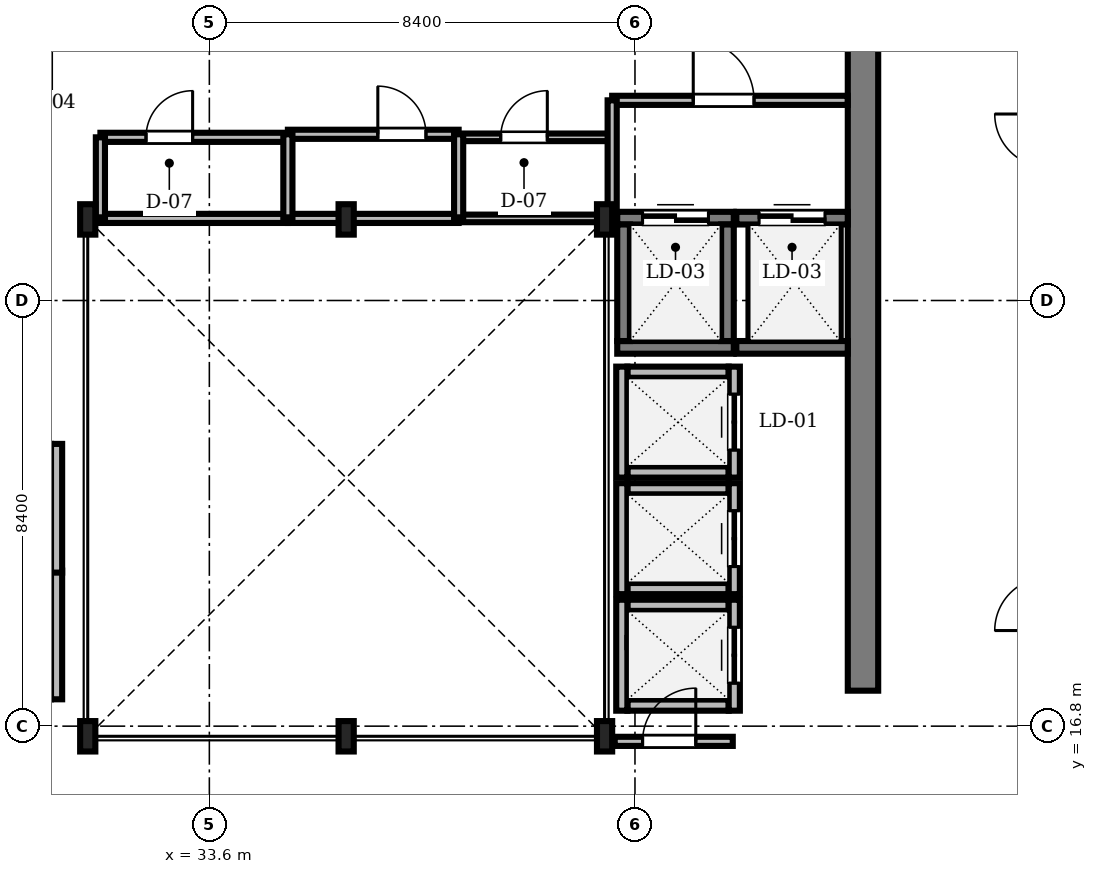
"""IFC4 building model, lengths in metres.
Left out: names, types, materials, properties, quantities, classifications, styles, units other than length and angle.
Written with IfcOpenShell. Run it as: python <this file> out.ifc"""

import sys

from ifc_helpers import new_model, si_unit, direction, frame, frame_2d, origin, origin_2d, place, context, subcontext, project, spatial, rectangle, i_section, extrude, source, transform, mapped, element, fill, save


model = new_model("IFC4")
c1 = context("Model", 3, precision=1e-05, world=origin(), true_north=direction((0.0, 1.0)))
c2 = subcontext(c1, "Body", "Model", "MODEL_VIEW")
j1 = project(units=[si_unit("LENGTHUNIT", "METRE"), si_unit("PLANEANGLEUNIT", "RADIAN")], contexts=[c1])
p1 = place(None, origin())
s1 = spatial("IfcSite", under=j1, at=p1, CompositionType="ELEMENT")
p2 = place(p1, origin())
s2 = spatial("IfcBuilding", under=s1, at=p2, CompositionType="ELEMENT")
p3 = place(p2, frame((0.0, 0.0, 242.7)))
s3 = spatial("IfcBuildingStorey", under=s2, at=p3, CompositionType="ELEMENT", Elevation=242.7)
m1 = source(origin(), c2, "Body", "SweptSolid", [
    extrude(rectangle(XDim=13.15, YDim=0.6, at=frame_2d((6.575, 0.0))), origin(), (0.0, 0.0, 1.0), 3.73),
])
p4 = place(p3, frame((46.5, 17.5, 0.0), z_axis=(0.0, 0.0, 1.0), x_axis=(0.0, 1.0, 0.0)))
e1 = element("IfcWall", 1, at=p4, inside=s3, PredefinedType="SHEAR", context=c2, shape_type="MappedRepresentation", body=[
    mapped(m1, transform((0.0, 0.0, 0.0), scale=1.0)),
])
m2 = source(origin(), c2, "Body", "SweptSolid", [
    extrude(i_section(OverallWidth=0.3, OverallDepth=0.6, WebThickness=0.015, FlangeThickness=0.03, FilletRadius=0.027, at=origin_2d()), origin(), (0.0, 0.0, 1.0), 3.73),
])
for number, where, z_axis, x_axis in (
    (2, (31.2, 16.6, 0.0), (0.0, 0.0, 1.0), (1.0, 0.0, 0.0)),
    (3, (36.3, 16.6, 0.0), (0.0, 0.0, 1.0), (1.0, 0.0, 0.0)),
    (4, (41.4, 16.6, 0.0), (0.0, 0.0, 1.0), (1.0, 0.0, 0.0)),
    (5, (41.4, 26.8, 0.0), (0.0, 0.0, 1.0), (1.0, 0.0, 0.0)),
    (6, (36.3, 26.8, 0.0), (0.0, 0.0, 1.0), (1.0, 0.0, 0.0)),
    (7, (31.2, 26.8, 0.0), (0.0, 0.0, 1.0), (1.0, 0.0, 0.0)),
):
    element("IfcColumn", number, at=place(p3, frame(where, z_axis=z_axis, x_axis=x_axis)), inside=s3, PredefinedType="COLUMN", context=c2, shape_type="MappedRepresentation", body=[
        mapped(m2, transform((0.0, 0.0, 0.0), scale=1.0)),
    ])
m3 = source(origin(), c2, "Body", "SweptSolid", [
    extrude(rectangle(XDim=2.0, YDim=0.22, at=frame_2d((1.0, 0.0))), origin(), (0.0, 0.0, 1.0), 3.73),
])
for number, where, z_axis, x_axis in (
    (8, (41.85, 21.815, 0.0), (0.0, 0.0, 1.0), (1.0, 0.0, 0.0)),
    (9, (41.85, 23.785, 0.0), (0.0, 0.0, 1.0), (1.0, 0.0, 0.0)),
):
    element("IfcWall", number, at=place(p3, frame(where, z_axis=z_axis, x_axis=x_axis)), inside=s3, PredefinedType="SOLIDWALL", context=c2, shape_type="MappedRepresentation", body=[
        mapped(m3, transform((0.0, 0.0, 0.0), scale=1.0)),
    ])
m4 = source(origin(), c2, "Body", "SweptSolid", [
    extrude(rectangle(XDim=2.19, YDim=0.22, at=frame_2d((1.095, 0.0))), origin(), (0.0, 0.0, 1.0), 3.73),
])
p5 = place(p3, frame((41.74, 21.705, 0.0), z_axis=(0.0, 0.0, 1.0), x_axis=(0.0, 1.0, 0.0)))
e10 = element("IfcWall", 10, at=p5, inside=s3, PredefinedType="SOLIDWALL", context=c2, shape_type="MappedRepresentation", body=[
    mapped(m4, transform((0.0, 0.0, 0.0), scale=1.0)),
])
p6 = place(p3, frame((43.96, 21.705, 0.0), z_axis=(0.0, 0.0, 1.0), x_axis=(0.0, 1.0, 0.0)))
e11 = element("IfcWall", 11, at=p6, inside=s3, PredefinedType="SOLIDWALL", context=c2, shape_type="MappedRepresentation", body=[
    mapped(m4, transform((0.0, 0.0, 0.0), scale=1.0)),
])
m5 = source(origin(), c2, "Body", "SweptSolid", [
    extrude(rectangle(XDim=1.1, YDim=2.2, at=frame_2d((0.55, 1.1))), frame((0.0, 0.12, 0.0), z_axis=(0.0, -1.0, 0.0), x_axis=(1.0, 0.0, 0.0)), (0.0, 0.0, 1.0), 0.24),
])
p7 = place(p6, frame((0.545, 0.0, 0.0)))
e12 = element("IfcOpeningElement", 12, at=p7, cuts=e11, PredefinedType="OPENING", context=c2, shape_type="MappedRepresentation", body=[
    mapped(m5, transform((0.0, 0.0, 0.0), scale=1.0)),
])
for number, where, z_axis, x_axis in (
    (13, (41.85, 19.515, 0.0), (0.0, 0.0, 1.0), (1.0, 0.0, 0.0)),
    (14, (41.85, 21.485, 0.0), (0.0, 0.0, 1.0), (1.0, 0.0, 0.0)),
):
    element("IfcWall", number, at=place(p3, frame(where, z_axis=z_axis, x_axis=x_axis)), inside=s3, PredefinedType="SOLIDWALL", context=c2, shape_type="MappedRepresentation", body=[
        mapped(m3, transform((0.0, 0.0, 0.0), scale=1.0)),
    ])
p8 = place(p3, frame((41.74, 19.405, 0.0), z_axis=(0.0, 0.0, 1.0), x_axis=(0.0, 1.0, 0.0)))
e15 = element("IfcWall", 15, at=p8, inside=s3, PredefinedType="SOLIDWALL", context=c2, shape_type="MappedRepresentation", body=[
    mapped(m4, transform((0.0, 0.0, 0.0), scale=1.0)),
])
p9 = place(p3, frame((43.96, 19.405, 0.0), z_axis=(0.0, 0.0, 1.0), x_axis=(0.0, 1.0, 0.0)))
e16 = element("IfcWall", 16, at=p9, inside=s3, PredefinedType="SOLIDWALL", context=c2, shape_type="MappedRepresentation", body=[
    mapped(m4, transform((0.0, 0.0, 0.0), scale=1.0)),
])
p10 = place(p9, frame((0.545, 0.0, 0.0)))
e17 = element("IfcOpeningElement", 17, at=p10, cuts=e16, PredefinedType="OPENING", context=c2, shape_type="MappedRepresentation", body=[
    mapped(m5, transform((0.0, 0.0, 0.0), scale=1.0)),
])
for number, where, z_axis, x_axis in (
    (18, (41.85, 17.215, 0.0), (0.0, 0.0, 1.0), (1.0, 0.0, 0.0)),
    (19, (41.85, 19.185, 0.0), (0.0, 0.0, 1.0), (1.0, 0.0, 0.0)),
):
    element("IfcWall", number, at=place(p3, frame(where, z_axis=z_axis, x_axis=x_axis)), inside=s3, PredefinedType="SOLIDWALL", context=c2, shape_type="MappedRepresentation", body=[
        mapped(m3, transform((0.0, 0.0, 0.0), scale=1.0)),
    ])
p11 = place(p3, frame((41.74, 17.105, 0.0), z_axis=(0.0, 0.0, 1.0), x_axis=(0.0, 1.0, 0.0)))
e20 = element("IfcWall", 20, at=p11, inside=s3, PredefinedType="SOLIDWALL", context=c2, shape_type="MappedRepresentation", body=[
    mapped(m4, transform((0.0, 0.0, 0.0), scale=1.0)),
])
p12 = place(p3, frame((43.96, 17.105, 0.0), z_axis=(0.0, 0.0, 1.0), x_axis=(0.0, 1.0, 0.0)))
e21 = element("IfcWall", 21, at=p12, inside=s3, PredefinedType="SOLIDWALL", context=c2, shape_type="MappedRepresentation", body=[
    mapped(m4, transform((0.0, 0.0, 0.0), scale=1.0)),
])
p13 = place(p12, frame((0.545, 0.0, 0.0)))
e22 = element("IfcOpeningElement", 22, at=p13, cuts=e21, PredefinedType="OPENING", context=c2, shape_type="MappedRepresentation", body=[
    mapped(m5, transform((0.0, 0.0, 0.0), scale=1.0)),
])
m6 = source(origin(), c2, "Body", "SweptSolid", [
    extrude(rectangle(XDim=2.54, YDim=0.22, at=frame_2d((1.27, 0.0))), origin(), (0.0, 0.0, 1.0), 3.73),
])
for number, where, z_axis, x_axis in (
    (23, (30.585, 17.33, 0.0), (0.0, 0.0, 1.0), (0.0, 1.0, 0.0)),
    (24, (30.585, 19.83, 0.0), (0.0, 0.0, 1.0), (0.0, 1.0, 0.0)),
):
    element("IfcWall", number, at=place(p3, frame(where, z_axis=z_axis, x_axis=x_axis)), inside=s3, PredefinedType="SOLIDWALL", context=c2, shape_type="MappedRepresentation", body=[
        mapped(m6, transform((0.0, 0.0, 0.0), scale=1.0)),
    ])
m7 = source(origin(), c2, "Body", "SweptSolid", [
    extrude(rectangle(XDim=2.3, YDim=0.25, at=frame_2d((1.15, 0.0))), origin(), (0.0, 0.0, 1.0), 3.73),
])
p14 = place(p3, frame((41.65, 24.275, 0.0), z_axis=(0.0, 0.0, 1.0), x_axis=(1.0, 0.0, 0.0)))
e25 = element("IfcWall", 25, at=p14, inside=s3, PredefinedType="SOLIDWALL", context=c2, shape_type="MappedRepresentation", body=[
    mapped(m7, transform((0.0, 0.0, 0.0), scale=1.0)),
])
p15 = place(p3, frame((41.65, 26.825, 0.0), z_axis=(0.0, 0.0, 1.0), x_axis=(1.0, 0.0, 0.0)))
e26 = element("IfcWall", 26, at=p15, inside=s3, PredefinedType="SOLIDWALL", context=c2, shape_type="MappedRepresentation", body=[
    mapped(m7, transform((0.0, 0.0, 0.0), scale=1.0)),
])
m8 = source(origin(), c2, "Body", "SweptSolid", [
    extrude(rectangle(XDim=1.3, YDim=2.3, at=frame_2d((0.65, 1.15))), frame((0.0, 0.135, 0.0), z_axis=(0.0, -1.0, 0.0), x_axis=(1.0, 0.0, 0.0)), (0.0, 0.0, 1.0), 0.27),
])
p16 = place(p15, frame((0.5, 0.0, 0.0)))
e27 = element("IfcOpeningElement", 27, at=p16, cuts=e26, PredefinedType="OPENING", context=c2, shape_type="MappedRepresentation", body=[
    mapped(m8, transform((0.0, 0.0, 0.0), scale=1.0)),
])
for number, where, z_axis, x_axis in (
    (28, (41.775, 24.4, 0.0), (0.0, 0.0, 1.0), (0.0, 1.0, 0.0)),
    (29, (43.825, 24.4, 0.0), (0.0, 0.0, 1.0), (0.0, 1.0, 0.0)),
):
    element("IfcWall", number, at=place(p3, frame(where, z_axis=z_axis, x_axis=x_axis)), inside=s3, PredefinedType="SOLIDWALL", context=c2, shape_type="MappedRepresentation", body=[
        mapped(m7, transform((0.0, 0.0, 0.0), scale=1.0)),
    ])
m9 = source(origin(), c2, "Body", "SweptSolid", [
    extrude(rectangle(XDim=2.2, YDim=0.25, at=frame_2d((1.1, 0.0))), origin(), (0.0, 0.0, 1.0), 3.73),
])
p17 = place(p3, frame((44.0, 24.275, 0.0), z_axis=(0.0, 0.0, 1.0), x_axis=(1.0, 0.0, 0.0)))
e30 = element("IfcWall", 30, at=p17, inside=s3, PredefinedType="SOLIDWALL", context=c2, shape_type="MappedRepresentation", body=[
    mapped(m9, transform((0.0, 0.0, 0.0), scale=1.0)),
])
p18 = place(p3, frame((44.0, 26.825, 0.0), z_axis=(0.0, 0.0, 1.0), x_axis=(1.0, 0.0, 0.0)))
e31 = element("IfcWall", 31, at=p18, inside=s3, PredefinedType="SOLIDWALL", context=c2, shape_type="MappedRepresentation", body=[
    mapped(m9, transform((0.0, 0.0, 0.0), scale=1.0)),
])
p19 = place(p18, frame((0.45, 0.0, 0.0)))
e32 = element("IfcOpeningElement", 32, at=p19, cuts=e31, PredefinedType="OPENING", context=c2, shape_type="MappedRepresentation", body=[
    mapped(m8, transform((0.0, 0.0, 0.0), scale=1.0)),
])
m10 = source(origin(), c2, "Body", "SweptSolid", [
    extrude(rectangle(XDim=4.648, YDim=0.18, at=frame_2d((2.324, 0.0))), origin(), (0.0, 0.0, 1.0), 3.362),
])
p20 = place(p3, frame((41.55, 29.15, 0.0), z_axis=(0.0, 0.0, 1.0), x_axis=(1.0, 0.0, 0.0)))
e33 = element("IfcWall", 33, at=p20, inside=s3, PredefinedType="PARTITIONING", context=c2, shape_type="MappedRepresentation", body=[
    mapped(m10, transform((0.0, 0.0, 0.0), scale=1.0)),
])
m11 = source(origin(), c2, "Body", "SweptSolid", [
    extrude(rectangle(XDim=1.2, YDim=2.2, at=frame_2d((0.6, 1.1))), frame((0.0, 0.1, 0.0), z_axis=(0.0, -1.0, 0.0), x_axis=(1.0, 0.0, 0.0)), (0.0, 0.0, 1.0), 0.2),
])
p21 = place(p20, frame((1.6, 0.0, 0.0)))
e34 = element("IfcOpeningElement", 34, at=p21, cuts=e33, PredefinedType="OPENING", context=c2, shape_type="MappedRepresentation", body=[
    mapped(m11, transform((0.0, 0.0, 0.0), scale=1.0)),
])
m12 = source(origin(), c2, "Body", "SweptSolid", [
    extrude(rectangle(XDim=3.7, YDim=0.18, at=frame_2d((1.85, 0.0))), origin(), (0.0, 0.0, 1.0), 3.362),
])
p22 = place(p3, frame((31.45, 28.42, 0.0), z_axis=(0.0, 0.0, 1.0), x_axis=(1.0, 0.0, 0.0)))
e35 = element("IfcWall", 35, at=p22, inside=s3, PredefinedType="PARTITIONING", context=c2, shape_type="MappedRepresentation", body=[
    mapped(m12, transform((0.0, 0.0, 0.0), scale=1.0)),
])
m13 = source(origin(), c2, "Body", "SweptSolid", [
    extrude(rectangle(XDim=0.92, YDim=2.1, at=frame_2d((0.46, 1.05))), frame((0.0, 0.1, 0.0), z_axis=(0.0, -1.0, 0.0), x_axis=(1.0, 0.0, 0.0)), (0.0, 0.0, 1.0), 0.2),
])
p23 = place(p22, frame((0.9, 0.0, 0.0)))
e36 = element("IfcOpeningElement", 36, at=p23, cuts=e35, PredefinedType="OPENING", context=c2, shape_type="MappedRepresentation", body=[
    mapped(m13, transform((0.0, 0.0, 0.0), scale=1.0)),
])
m14 = source(origin(), c2, "Body", "SweptSolid", [
    extrude(rectangle(XDim=3.37, YDim=0.18, at=frame_2d((1.685, 0.0))), origin(), (0.0, 0.0, 1.0), 3.73),
])
p24 = place(p3, frame((35.15, 28.48, 0.0), z_axis=(0.0, 0.0, 1.0), x_axis=(1.0, 0.0, 0.0)))
e37 = element("IfcWall", 37, at=p24, inside=s3, PredefinedType="PARTITIONING", context=c2, shape_type="MappedRepresentation", body=[
    mapped(m14, transform((0.0, 0.0, 0.0), scale=1.0)),
])
m15 = source(origin(), c2, "Body", "SweptSolid", [
    extrude(rectangle(XDim=0.95, YDim=2.15, at=frame_2d((0.475, 1.075))), frame((0.0, 0.1, 0.0), z_axis=(0.0, -1.0, 0.0), x_axis=(1.0, 0.0, 0.0)), (0.0, 0.0, 1.0), 0.2),
])
p25 = place(p24, frame((1.775, 0.0, 0.0)))
e38 = element("IfcOpeningElement", 38, at=p25, cuts=e37, PredefinedType="OPENING", context=c2, shape_type="MappedRepresentation", body=[
    mapped(m15, transform((0.0, 0.0, 0.0), scale=1.0)),
])
m16 = source(origin(), c2, "Body", "SweptSolid", [
    extrude(rectangle(XDim=3.0, YDim=0.15, at=frame_2d((1.5, 0.0))), origin(), (0.0, 0.0, 1.0), 3.73),
])
p26 = place(p3, frame((38.52, 28.42, 0.0), z_axis=(0.0, 0.0, 1.0), x_axis=(1.0, 0.0, 0.0)))
e39 = element("IfcWall", 39, at=p26, inside=s3, PredefinedType="PARTITIONING", context=c2, shape_type="MappedRepresentation", body=[
    mapped(m16, transform((0.0, 0.0, 0.0), scale=1.0)),
])
m17 = source(origin(), c2, "Body", "SweptSolid", [
    extrude(rectangle(XDim=0.92, YDim=2.1, at=frame_2d((0.46, 1.05))), frame((0.0, 0.085, 0.0), z_axis=(0.0, -1.0, 0.0), x_axis=(1.0, 0.0, 0.0)), (0.0, 0.0, 1.0), 0.17),
])
p27 = place(p26, frame((0.83, 0.0, 0.0)))
e40 = element("IfcOpeningElement", 40, at=p27, cuts=e39, PredefinedType="OPENING", context=c2, shape_type="MappedRepresentation", body=[
    mapped(m17, transform((0.0, 0.0, 0.0), scale=1.0)),
])
m18 = source(origin(), c2, "Body", "SweptSolid", [
    extrude(rectangle(XDim=2.33, YDim=0.18, at=frame_2d((1.165, 0.0))), origin(), (0.0, 0.0, 1.0), 3.172),
])
p28 = place(p3, frame((41.6, 16.5, 0.0), z_axis=(0.0, 0.0, 1.0), x_axis=(1.0, 0.0, 0.0)))
e41 = element("IfcWall", 41, at=p28, inside=s3, PredefinedType="PARTITIONING", context=c2, shape_type="MappedRepresentation", body=[
    mapped(m18, transform((0.0, 0.0, 0.0), scale=1.0)),
])
m19 = source(origin(), c2, "Body", "SweptSolid", [
    extrude(rectangle(XDim=1.05, YDim=2.2, at=frame_2d((0.525, 1.1))), frame((0.0, 0.1, 0.0), z_axis=(0.0, -1.0, 0.0), x_axis=(1.0, 0.0, 0.0)), (0.0, 0.0, 1.0), 0.2),
])
p29 = place(p28, frame((0.55, 0.0, 0.0)))
e42 = element("IfcOpeningElement", 42, at=p29, cuts=e41, PredefinedType="OPENING", context=c2, shape_type="MappedRepresentation", body=[
    mapped(m19, transform((0.0, 0.0, 0.0), scale=1.0)),
])
m20 = source(origin(), c2, "Body", "SweptSolid", [
    extrude(rectangle(XDim=3.7, YDim=0.18, at=frame_2d((1.85, 0.0))), origin(), (0.0, 0.0, 1.0), 3.272),
])
p30 = place(p3, frame((31.45, 26.82, 0.0), z_axis=(0.0, 0.0, 1.0), x_axis=(1.0, 0.0, 0.0)))
e43 = element("IfcWall", 43, at=p30, inside=s3, PredefinedType="PARTITIONING", context=c2, shape_type="MappedRepresentation", body=[
    mapped(m20, transform((0.0, 0.0, 0.0), scale=1.0)),
])
m21 = source(origin(), c2, "Body", "SweptSolid", [
    extrude(rectangle(XDim=3.37, YDim=0.18, at=frame_2d((1.685, 0.0))), origin(), (0.0, 0.0, 1.0), 3.272),
])
p31 = place(p3, frame((35.15, 26.82, 0.0), z_axis=(0.0, 0.0, 1.0), x_axis=(1.0, 0.0, 0.0)))
e44 = element("IfcWall", 44, at=p31, inside=s3, PredefinedType="PARTITIONING", context=c2, shape_type="MappedRepresentation", body=[
    mapped(m21, transform((0.0, 0.0, 0.0), scale=1.0)),
])
m22 = source(origin(), c2, "Body", "SweptSolid", [
    extrude(rectangle(XDim=3.0, YDim=0.15, at=frame_2d((1.5, 0.0))), origin(), (0.0, 0.0, 1.0), 3.272),
])
p32 = place(p3, frame((38.52, 26.82, 0.0), z_axis=(0.0, 0.0, 1.0), x_axis=(1.0, 0.0, 0.0)))
e45 = element("IfcWall", 45, at=p32, inside=s3, PredefinedType="PARTITIONING", context=c2, shape_type="MappedRepresentation", body=[
    mapped(m22, transform((0.0, 0.0, 0.0), scale=1.0)),
])
m23 = source(origin(), c2, "Body", "SweptSolid", [
    extrude(rectangle(XDim=2.35, YDim=0.18, at=frame_2d((1.175, 0.0))), origin(), (0.0, 0.0, 1.0), 3.362),
])
p33 = place(p3, frame((41.55, 26.8, 0.0), z_axis=(0.0, 0.0, 1.0), x_axis=(0.0, 1.0, 0.0)))
e46 = element("IfcWall", 46, at=p33, inside=s3, PredefinedType="PARTITIONING", context=c2, shape_type="MappedRepresentation", body=[
    mapped(m23, transform((0.0, 0.0, 0.0), scale=1.0)),
])
m24 = source(origin(), c2, "Body", "SweptSolid", [
    extrude(rectangle(XDim=1.858, YDim=0.18, at=frame_2d((0.929, 0.0))), origin(), (0.0, 0.0, 1.0), 3.73),
])
p34 = place(p3, frame((41.852, 18.45, 0.0), z_axis=(0.0, 0.0, 1.0), x_axis=(1.0, 0.0, 0.0)))
e47 = element("IfcWall", 47, at=p34, inside=s3, PredefinedType="PARTITIONING", context=c2, shape_type="MappedRepresentation", body=[
    mapped(m24, transform((0.0, 0.0, 0.0), scale=1.0)),
])
m25 = source(origin(), c2, "Body", "SweptSolid", [
    extrude(rectangle(XDim=1.66, YDim=0.18, at=frame_2d((0.83, 0.0))), origin(), (0.0, 0.0, 1.0), 3.272),
])
for number, where, z_axis, x_axis in (
    (48, (35.15, 26.82, 0.0), (0.0, 0.0, 1.0), (0.0, 1.0, 0.0)),
    (49, (38.52, 26.82, 0.0), (0.0, 0.0, 1.0), (0.0, 1.0, 0.0)),
):
    element("IfcWall", number, at=place(p3, frame(where, z_axis=z_axis, x_axis=x_axis)), inside=s3, PredefinedType="PARTITIONING", context=c2, shape_type="MappedRepresentation", body=[
        mapped(m25, transform((0.0, 0.0, 0.0), scale=1.0)),
    ])
m26 = source(origin(), c2, "Body", "SweptSolid", [
    extrude(rectangle(XDim=1.6, YDim=0.18, at=frame_2d((0.8, 0.0))), origin(), (0.0, 0.0, 1.0), 3.272),
])
p35 = place(p3, frame((31.45, 26.82, 0.0), z_axis=(0.0, 0.0, 1.0), x_axis=(0.0, 1.0, 0.0)))
e50 = element("IfcWall", 50, at=p35, inside=s3, PredefinedType="PARTITIONING", context=c2, shape_type="MappedRepresentation", body=[
    mapped(m26, transform((0.0, 0.0, 0.0), scale=1.0)),
])
m27 = source(origin(), c2, "Body", "SweptSolid", [
    extrude(rectangle(XDim=1.1, YDim=2.2, at=frame_2d((0.55, 1.1))), frame((0.0, 0.025, 0.0), z_axis=(0.0, -1.0, 0.0), x_axis=(1.0, 0.0, 0.0)), (0.0, 0.0, 1.0), 0.05),
])
p36 = place(p7, origin())
e51 = element("IfcDoor", 51, at=p36, inside=s3, OperationType="DOUBLE_DOOR_SLIDING", PredefinedType="DOOR", context=c2, shape_type="MappedRepresentation", body=[
    mapped(m27, transform((0.0, 0.0, 0.0), scale=1.0)),
])
fill(e12, e51)
p37 = place(p10, origin())
e52 = element("IfcDoor", 52, at=p37, inside=s3, OperationType="DOUBLE_DOOR_SLIDING", PredefinedType="DOOR", context=c2, shape_type="MappedRepresentation", body=[
    mapped(m27, transform((0.0, 0.0, 0.0), scale=1.0)),
])
fill(e17, e52)
p38 = place(p13, origin())
e53 = element("IfcDoor", 53, at=p38, inside=s3, OperationType="DOUBLE_DOOR_SLIDING", PredefinedType="DOOR", context=c2, shape_type="MappedRepresentation", body=[
    mapped(m27, transform((0.0, 0.0, 0.0), scale=1.0)),
])
fill(e22, e53)
m28 = source(origin(), c2, "Body", "SweptSolid", [
    extrude(rectangle(XDim=1.3, YDim=2.3, at=frame_2d((0.65, 1.15))), frame((0.0, 0.025, 0.0), z_axis=(0.0, -1.0, 0.0), x_axis=(1.0, 0.0, 0.0)), (0.0, 0.0, 1.0), 0.05),
])
p39 = place(p16, origin())
e54 = element("IfcDoor", 54, at=p39, inside=s3, OperationType="DOUBLE_DOOR_SLIDING", PredefinedType="DOOR", context=c2, shape_type="MappedRepresentation", body=[
    mapped(m28, transform((0.0, 0.0, 0.0), scale=1.0)),
])
fill(e27, e54)
p40 = place(p19, origin())
e55 = element("IfcDoor", 55, at=p40, inside=s3, OperationType="DOUBLE_DOOR_SLIDING", PredefinedType="DOOR", context=c2, shape_type="MappedRepresentation", body=[
    mapped(m28, transform((0.0, 0.0, 0.0), scale=1.0)),
])
fill(e32, e55)
m29 = source(origin(), c2, "Body", "SweptSolid", [
    extrude(rectangle(XDim=1.2, YDim=2.2, at=frame_2d((0.6, 1.1))), frame((0.0, 0.025, 0.0), z_axis=(0.0, -1.0, 0.0), x_axis=(1.0, 0.0, 0.0)), (0.0, 0.0, 1.0), 0.05),
])
p41 = place(p21, origin())
e56 = element("IfcDoor", 56, at=p41, inside=s3, OperationType="SINGLE_SWING_LEFT", PredefinedType="DOOR", context=c2, shape_type="MappedRepresentation", body=[
    mapped(m29, transform((0.0, 0.0, 0.0), scale=1.0)),
])
fill(e34, e56)
m30 = source(origin(), c2, "Body", "SweptSolid", [
    extrude(rectangle(XDim=0.92, YDim=2.1, at=frame_2d((0.46, 1.05))), frame((0.0, 0.025, 0.0), z_axis=(0.0, -1.0, 0.0), x_axis=(1.0, 0.0, 0.0)), (0.0, 0.0, 1.0), 0.05),
])
p42 = place(p23, origin())
e57 = element("IfcDoor", 57, at=p42, inside=s3, OperationType="SINGLE_SWING_RIGHT", PredefinedType="DOOR", context=c2, shape_type="MappedRepresentation", body=[
    mapped(m30, transform((0.0, 0.0, 0.0), scale=1.0)),
])
fill(e36, e57)
m31 = source(origin(), c2, "Body", "SweptSolid", [
    extrude(rectangle(XDim=0.95, YDim=2.15, at=frame_2d((0.475, 1.075))), frame((0.0, 0.025, 0.0), z_axis=(0.0, -1.0, 0.0), x_axis=(1.0, 0.0, 0.0)), (0.0, 0.0, 1.0), 0.05),
])
p43 = place(p25, origin())
e58 = element("IfcDoor", 58, at=p43, inside=s3, OperationType="SINGLE_SWING_LEFT", PredefinedType="DOOR", context=c2, shape_type="MappedRepresentation", body=[
    mapped(m31, transform((0.0, 0.0, 0.0), scale=1.0)),
])
fill(e38, e58)
p44 = place(p27, origin())
e59 = element("IfcDoor", 59, at=p44, inside=s3, OperationType="SINGLE_SWING_RIGHT", PredefinedType="DOOR", context=c2, shape_type="MappedRepresentation", body=[
    mapped(m30, transform((0.0, 0.0, 0.0), scale=1.0)),
])
fill(e40, e59)
m32 = source(origin(), c2, "Body", "SweptSolid", [
    extrude(rectangle(XDim=1.05, YDim=2.2, at=frame_2d((0.525, 1.1))), frame((0.0, 0.025, 0.0), z_axis=(0.0, -1.0, 0.0), x_axis=(1.0, 0.0, 0.0)), (0.0, 0.0, 1.0), 0.05),
])
p45 = place(p29, origin())
e60 = element("IfcDoor", 60, at=p45, inside=s3, OperationType="SINGLE_SWING_RIGHT", PredefinedType="DOOR", context=c2, shape_type="MappedRepresentation", body=[
    mapped(m32, transform((0.0, 0.0, 0.0), scale=1.0)),
])
fill(e42, e60)
save(model, sys.argv[1])
